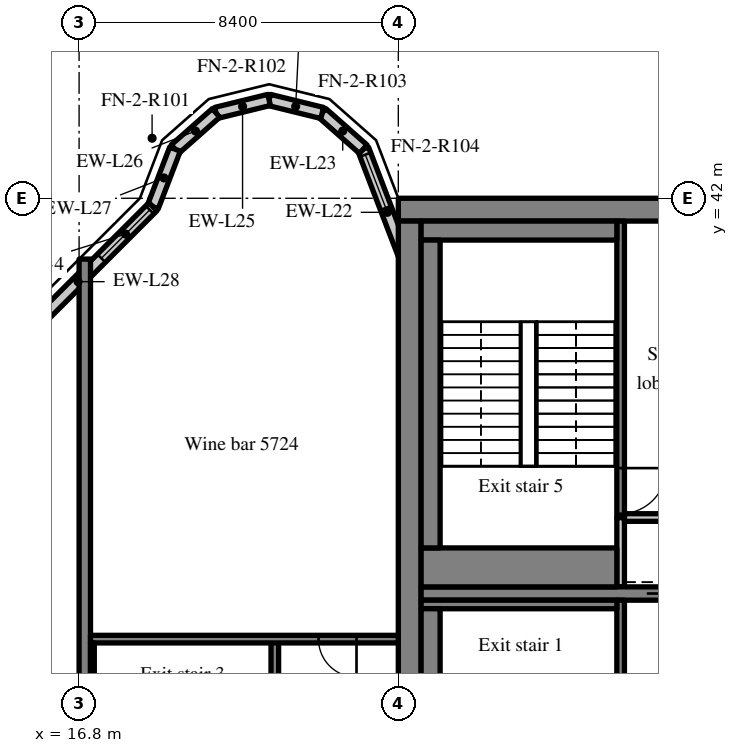
"""IFC4 building model, lengths in metres.
Left out: names, types, materials, properties, quantities, classifications, styles, units other than length and angle.
Written with IfcOpenShell. Run it as: python <this file> out.ifc"""

import sys

from ifc_helpers import new_model, si_unit, direction, frame, frame_2d, origin, place, context, subcontext, project, spatial, rectangle, extrude, source, transform, mapped, element, fill, save


model = new_model("IFC4")
c1 = context("Model", 3, precision=1e-05, world=origin(), true_north=direction((0.0, 1.0)))
c2 = subcontext(c1, "Body", "Model", "MODEL_VIEW")
j1 = project(units=[si_unit("LENGTHUNIT", "METRE"), si_unit("PLANEANGLEUNIT", "RADIAN")], contexts=[c1])
p1 = place(None, origin())
s1 = spatial("IfcSite", under=j1, at=p1, CompositionType="ELEMENT")
p2 = place(p1, origin())
s2 = spatial("IfcBuilding", under=s1, at=p2, CompositionType="ELEMENT")
p3 = place(p2, frame((0.0, 0.0, 237.4)))
s3 = spatial("IfcBuildingStorey", under=s2, at=p3, CompositionType="ELEMENT", Elevation=237.4)
m1 = source(origin(), c2, "Body", "SweptSolid", [
    extrude(rectangle(XDim=50.4, YDim=0.6, at=frame_2d((25.2, 0.0))), origin(), (0.0, 0.0, 1.0), 3.62),
])
p4 = place(p3, frame((25.2, 41.7, 0.0), z_axis=(0.0, 0.0, 1.0), x_axis=(1.0, 0.0, 0.0)))
e1 = element("IfcWall", 1, at=p4, inside=s3, PredefinedType="SHEAR", context=c2, shape_type="MappedRepresentation", body=[
    mapped(m1, transform((0.0, 0.0, 0.0), scale=1.0)),
])
m2 = source(origin(), c2, "Body", "SweptSolid", [
    extrude(rectangle(XDim=18.8, YDim=0.6, at=frame_2d((9.4, 0.0))), origin(), (0.0, 0.0, 1.0), 3.62),
])
p5 = place(p3, frame((25.5, 22.6, 0.0), z_axis=(0.0, 0.0, 1.0), x_axis=(0.0, 1.0, 0.0)))
e2 = element("IfcWall", 2, at=p5, inside=s3, PredefinedType="SHEAR", context=c2, shape_type="MappedRepresentation", body=[
    mapped(m2, transform((0.0, 0.0, 0.0), scale=1.0)),
])
m3 = source(origin(), c2, "Body", "SweptSolid", [
    extrude(rectangle(XDim=7.625, YDim=0.35, at=frame_2d((3.812, 0.0))), origin(), (0.0, 0.0, 1.0), 3.62),
])
p6 = place(p3, frame((25.8, 31.6, 0.0), z_axis=(0.0, 0.0, 1.0), x_axis=(1.0, 0.0, 0.0)))
e3 = element("IfcWall", 3, at=p6, inside=s3, PredefinedType="SHEAR", context=c2, shape_type="MappedRepresentation", body=[
    mapped(m3, transform((0.0, 0.0, 0.0), scale=1.0)),
])
m4 = source(origin(), c2, "Body", "SweptSolid", [
    extrude(rectangle(XDim=1.1, YDim=2.1, at=frame_2d((0.55, 1.05))), frame((0.0, 0.185, 0.0), z_axis=(0.0, -1.0, 0.0), x_axis=(1.0, 0.0, 0.0)), (0.0, 0.0, 1.0), 0.37),
])
p7 = place(p6, frame((5.938, 0.0, 0.0)))
e4 = element("IfcOpeningElement", 4, at=p7, cuts=e3, PredefinedType="OPENING", context=c2, shape_type="MappedRepresentation", body=[
    mapped(m4, transform((0.0, 0.0, 0.0), scale=1.0)),
])
m5 = source(origin(), c2, "Body", "SweptSolid", [
    extrude(rectangle(XDim=18.4, YDim=0.3, at=frame_2d((9.2, 0.0))), origin(), (0.0, 0.0, 1.0), 3.62),
])
p8 = place(p3, frame((16.95, 22.0, 0.0), z_axis=(0.0, 0.0, 1.0), x_axis=(0.0, 1.0, 0.0)))
e5 = element("IfcWall", 5, at=p8, inside=s3, PredefinedType="SHEAR", context=c2, shape_type="MappedRepresentation", body=[
    mapped(m5, transform((0.0, 0.0, 0.0), scale=1.0)),
])
m6 = source(origin(), c2, "Body", "SweptSolid", [
    extrude(rectangle(XDim=3.559, YDim=0.3, at=frame_2d((1.78, 0.0))), origin(), (0.0, 0.0, 1.0), 3.62),
])
p9 = place(p3, frame((25.55, 39.969, 0.0), z_axis=(0.0, 0.0, 1.0), x_axis=(-0.35779745313, 0.933799219604, 0.0)))
e6 = element("IfcWall", 6, at=p9, inside=s3, PredefinedType="SOLIDWALL", context=c2, shape_type="MappedRepresentation", body=[
    mapped(m6, transform((0.0, 0.0, 0.0), scale=1.0)),
])
m7 = source(origin(), c2, "Body", "SweptSolid", [
    extrude(rectangle(XDim=1.5, YDim=2.0, at=frame_2d((0.75, 1.0))), frame((0.0, 0.16, 0.0), z_axis=(0.0, -1.0, 0.0), x_axis=(1.0, 0.0, 0.0)), (0.0, 0.0, 1.0), 0.32),
])
p10 = place(p9, frame((1.903, 0.0, 0.9)))
e7 = element("IfcOpeningElement", 7, at=p10, cuts=e6, PredefinedType="OPENING", context=c2, shape_type="MappedRepresentation", body=[
    mapped(m7, transform((0.0, 0.0, 0.0), scale=1.0)),
])
m8 = source(origin(), c2, "Body", "SweptSolid", [
    extrude(rectangle(XDim=1.44, YDim=0.3, at=frame_2d((0.72, 0.0))), origin(), (0.0, 0.0, 1.0), 3.62),
])
p11 = place(p3, frame((24.277, 43.292, 0.0), z_axis=(0.0, 0.0, 1.0), x_axis=(-0.749649827867, 0.661834673902, 0.0)))
e8 = element("IfcWall", 8, at=p11, inside=s3, PredefinedType="SOLIDWALL", context=c2, shape_type="MappedRepresentation", body=[
    mapped(m8, transform((0.0, 0.0, 0.0), scale=1.0)),
])
m9 = source(origin(), c2, "Body", "SweptSolid", [
    extrude(rectangle(XDim=1.438, YDim=0.3, at=frame_2d((0.719, 0.0))), origin(), (0.0, 0.0, 1.0), 3.62),
])
p12 = place(p3, frame((23.197, 44.245, 0.0), z_axis=(0.0, 0.0, 1.0), x_axis=(-0.971152283879, 0.238460146601, 0.0)))
e9 = element("IfcWall", 9, at=p12, inside=s3, PredefinedType="SOLIDWALL", context=c2, shape_type="MappedRepresentation", body=[
    mapped(m9, transform((0.0, 0.0, 0.0), scale=1.0)),
])
m10 = source(origin(), c2, "Body", "SweptSolid", [
    extrude(rectangle(XDim=1.439, YDim=0.3, at=frame_2d((0.719, 0.0))), origin(), (0.0, 0.0, 1.0), 3.62),
])
p13 = place(p3, frame((21.8, 44.588, 0.0), z_axis=(0.0, 0.0, 1.0), x_axis=(-0.971161932466, -0.238420848351, 0.0)))
e10 = element("IfcWall", 10, at=p13, inside=s3, PredefinedType="SOLIDWALL", context=c2, shape_type="MappedRepresentation", body=[
    mapped(m10, transform((0.0, 0.0, 0.0), scale=1.0)),
])
m11 = source(origin(), c2, "Body", "SweptSolid", [
    extrude(rectangle(XDim=1.44, YDim=0.3, at=frame_2d((0.72, 0.0))), origin(), (0.0, 0.0, 1.0), 3.62),
])
p14 = place(p3, frame((20.403, 44.245, 0.0), z_axis=(0.0, 0.0, 1.0), x_axis=(-0.74957555648, -0.661918790432, 0.0)))
e11 = element("IfcWall", 11, at=p14, inside=s3, PredefinedType="SOLIDWALL", context=c2, shape_type="MappedRepresentation", body=[
    mapped(m11, transform((0.0, 0.0, 0.0), scale=1.0)),
])
m12 = source(origin(), c2, "Body", "SweptSolid", [
    extrude(rectangle(XDim=1.622, YDim=0.3, at=frame_2d((0.811, 0.0))), origin(), (0.0, 0.0, 1.0), 3.62),
])
p15 = place(p3, frame((19.323, 43.292, 0.0), z_axis=(0.0, 0.0, 1.0), x_axis=(-0.357778527068, -0.933806471154, 0.0)))
e12 = element("IfcWall", 12, at=p15, inside=s3, PredefinedType="SOLIDWALL", context=c2, shape_type="MappedRepresentation", body=[
    mapped(m12, transform((0.0, 0.0, 0.0), scale=1.0)),
])
m13 = source(origin(), c2, "Body", "SweptSolid", [
    extrude(rectangle(XDim=5.576, YDim=0.3, at=frame_2d((2.788, 0.0))), origin(), (0.0, 0.0, 1.0), 3.62),
])
p16 = place(p3, frame((18.743, 41.777, 0.0), z_axis=(0.0, 0.0, 1.0), x_axis=(-0.707106781187, -0.707106781187, 0.0)))
e13 = element("IfcWall", 13, at=p16, inside=s3, PredefinedType="SOLIDWALL", context=c2, shape_type="MappedRepresentation", body=[
    mapped(m13, transform((0.0, 0.0, 0.0), scale=1.0)),
])
m14 = source(origin(), c2, "Body", "SweptSolid", [
    extrude(rectangle(XDim=1.8, YDim=1.5, at=frame_2d((0.9, 0.75))), frame((0.0, 0.16, 0.0), z_axis=(0.0, -1.0, 0.0), x_axis=(1.0, 0.0, 0.0)), (0.0, 0.0, 1.0), 0.32),
])
p17 = place(p16, frame((0.118, 0.0, 0.9)))
e14 = element("IfcOpeningElement", 14, at=p17, cuts=e13, PredefinedType="OPENING", context=c2, shape_type="MappedRepresentation", body=[
    mapped(m14, transform((0.0, 0.0, 0.0), scale=1.0)),
])
m15 = source(origin(), c2, "Body", "SweptSolid", [
    extrude(rectangle(XDim=8.825, YDim=0.2, at=frame_2d((4.413, 0.0))), origin(), (0.0, 0.0, 1.0), 3.62),
])
p18 = place(p3, frame((31.05, 22.6, 0.0), z_axis=(0.0, 0.0, 1.0), x_axis=(0.0, 1.0, 0.0)))
e15 = element("IfcWall", 15, at=p18, inside=s3, PredefinedType="SOLIDWALL", context=c2, shape_type="MappedRepresentation", body=[
    mapped(m15, transform((0.0, 0.0, 0.0), scale=1.0)),
])
m16 = source(origin(), c2, "Body", "SweptSolid", [
    extrude(rectangle(XDim=1.2, YDim=2.1, at=frame_2d((0.6, 1.05))), frame((0.0, 0.11, 0.0), z_axis=(0.0, -1.0, 0.0), x_axis=(1.0, 0.0, 0.0)), (0.0, 0.0, 1.0), 0.22),
])
p19 = place(p18, frame((1.0, 0.0, 0.0)))
e16 = element("IfcOpeningElement", 16, at=p19, cuts=e15, PredefinedType="OPENING", context=c2, shape_type="MappedRepresentation", body=[
    mapped(m16, transform((0.0, 0.0, 0.0), scale=1.0)),
])
m17 = source(origin(), c2, "Body", "SweptSolid", [
    extrude(rectangle(XDim=1.825, YDim=0.2, at=frame_2d((0.913, 0.0))), origin(), (0.0, 0.0, 1.0), 3.62),
])
p20 = place(p3, frame((31.05, 31.775, 0.0), z_axis=(0.0, 0.0, 1.0), x_axis=(0.0, 1.0, 0.0)))
e17 = element("IfcWall", 17, at=p20, inside=s3, PredefinedType="SOLIDWALL", context=c2, shape_type="MappedRepresentation", body=[
    mapped(m17, transform((0.0, 0.0, 0.0), scale=1.0)),
])
m18 = source(origin(), c2, "Body", "SweptSolid", [
    extrude(rectangle(XDim=2.275, YDim=0.2, at=frame_2d((1.138, 0.0))), origin(), (0.0, 0.0, 1.0), 3.62),
])
p21 = place(p3, frame((31.15, 33.6, 0.0), z_axis=(0.0, 0.0, 1.0), x_axis=(1.0, 0.0, 0.0)))
e18 = element("IfcWall", 18, at=p21, inside=s3, PredefinedType="SOLIDWALL", context=c2, shape_type="MappedRepresentation", body=[
    mapped(m18, transform((0.0, 0.0, 0.0), scale=1.0)),
])
m19 = source(origin(), c2, "Body", "SweptSolid", [
    extrude(rectangle(XDim=7.8, YDim=0.2, at=frame_2d((3.9, 0.0))), origin(), (0.0, 0.0, 1.0), 3.62),
])
p22 = place(p3, frame((31.05, 33.6, 0.0), z_axis=(0.0, 0.0, 1.0), x_axis=(0.0, 1.0, 0.0)))
e19 = element("IfcWall", 19, at=p22, inside=s3, PredefinedType="SOLIDWALL", context=c2, shape_type="MappedRepresentation", body=[
    mapped(m19, transform((0.0, 0.0, 0.0), scale=1.0)),
])
p23 = place(p22, frame((0.1, 0.0, 0.0)))
e20 = element("IfcOpeningElement", 20, at=p23, cuts=e19, PredefinedType="OPENING", context=c2, shape_type="MappedRepresentation", body=[
    mapped(m16, transform((0.0, 0.0, 0.0), scale=1.0)),
])
m20 = source(origin(), c2, "Body", "SweptSolid", [
    extrude(rectangle(XDim=8.3, YDim=0.2, at=frame_2d((4.15, 0.0))), origin(), (0.0, 0.0, 1.0), 3.62),
])
p24 = place(p3, frame((21.95, 22.1, 0.0), z_axis=(0.0, 0.0, 1.0), x_axis=(0.0, 1.0, 0.0)))
e21 = element("IfcWall", 21, at=p24, inside=s3, PredefinedType="SOLIDWALL", context=c2, shape_type="MappedRepresentation", body=[
    mapped(m20, transform((0.0, 0.0, 0.0), scale=1.0)),
])
p25 = place(p24, frame((0.6, 0.0, 0.0)))
e22 = element("IfcOpeningElement", 22, at=p25, cuts=e21, PredefinedType="OPENING", context=c2, shape_type="MappedRepresentation", body=[
    mapped(m16, transform((0.0, 0.0, 0.0), scale=1.0)),
])
m21 = source(origin(), c2, "Body", "SweptSolid", [
    extrude(rectangle(XDim=8.1, YDim=0.2, at=frame_2d((4.05, 0.0))), origin(), (0.0, 0.0, 1.0), 3.62),
])
p26 = place(p3, frame((17.1, 30.4, 0.0), z_axis=(0.0, 0.0, 1.0), x_axis=(1.0, 0.0, 0.0)))
e23 = element("IfcWall", 23, at=p26, inside=s3, PredefinedType="SOLIDWALL", context=c2, shape_type="MappedRepresentation", body=[
    mapped(m21, transform((0.0, 0.0, 0.0), scale=1.0)),
])
m22 = source(origin(), c2, "Body", "SweptSolid", [
    extrude(rectangle(XDim=1.0, YDim=2.1, at=frame_2d((0.5, 1.05))), frame((0.0, 0.11, 0.0), z_axis=(0.0, -1.0, 0.0), x_axis=(1.0, 0.0, 0.0)), (0.0, 0.0, 1.0), 0.22),
])
p27 = place(p26, frame((6.0, 0.0, 0.0)))
e24 = element("IfcOpeningElement", 24, at=p27, cuts=e23, PredefinedType="OPENING", context=c2, shape_type="MappedRepresentation", body=[
    mapped(m22, transform((0.0, 0.0, 0.0), scale=1.0)),
])
m23 = source(origin(), c2, "Body", "SweptSolid", [
    extrude(rectangle(XDim=5.15, YDim=0.225, at=frame_2d((2.575, 0.0))), origin(), (0.0, 0.0, 1.0), 3.62),
])
p28 = place(p3, frame((25.8, 31.312, 0.0), z_axis=(0.0, 0.0, 1.0), x_axis=(1.0, 0.0, 0.0)))
e25 = element("IfcWall", 25, at=p28, inside=s3, PredefinedType="SOLIDWALL", context=c2, shape_type="MappedRepresentation", body=[
    mapped(m23, transform((0.0, 0.0, 0.0), scale=1.0)),
])
m24 = source(origin(), c2, "Body", "SweptSolid", [
    extrude(rectangle(XDim=8.1, YDim=0.5, at=frame_2d((4.05, 0.0))), origin(), (0.0, 0.0, 1.0), 3.62),
])
p29 = place(p3, frame((26.05, 23.1, 0.0), z_axis=(0.0, 0.0, 1.0), x_axis=(0.0, 1.0, 0.0)))
e26 = element("IfcWall", 26, at=p29, inside=s3, PredefinedType="SOLIDWALL", context=c2, shape_type="MappedRepresentation", body=[
    mapped(m24, transform((0.0, 0.0, 0.0), scale=1.0)),
])
m25 = source(origin(), c2, "Body", "SweptSolid", [
    extrude(rectangle(XDim=8.1, YDim=0.1, at=frame_2d((4.05, 0.0))), origin(), (0.0, 0.0, 1.0), 3.62),
])
p30 = place(p3, frame((17.15, 22.2, 0.0), z_axis=(0.0, 0.0, 1.0), x_axis=(0.0, 1.0, 0.0)))
e27 = element("IfcWall", 27, at=p30, inside=s3, PredefinedType="SOLIDWALL", context=c2, shape_type="MappedRepresentation", body=[
    mapped(m25, transform((0.0, 0.0, 0.0), scale=1.0)),
])
m26 = source(origin(), c2, "Body", "SweptSolid", [
    extrude(rectangle(XDim=5.15, YDim=0.5, at=frame_2d((2.575, 0.0))), origin(), (0.0, 0.0, 1.0), 3.62),
])
p31 = place(p3, frame((25.8, 41.15, 0.0), z_axis=(0.0, 0.0, 1.0), x_axis=(1.0, 0.0, 0.0)))
e28 = element("IfcWall", 28, at=p31, inside=s3, PredefinedType="SOLIDWALL", context=c2, shape_type="MappedRepresentation", body=[
    mapped(m26, transform((0.0, 0.0, 0.0), scale=1.0)),
])
m27 = source(origin(), c2, "Body", "SweptSolid", [
    extrude(rectangle(XDim=5.15, YDim=1.025, at=frame_2d((2.575, 0.0))), origin(), (0.0, 0.0, 1.0), 3.62),
])
p32 = place(p3, frame((25.8, 32.287, 0.0), z_axis=(0.0, 0.0, 1.0), x_axis=(1.0, 0.0, 0.0)))
e29 = element("IfcWall", 29, at=p32, inside=s3, PredefinedType="SOLIDWALL", context=c2, shape_type="MappedRepresentation", body=[
    mapped(m27, transform((0.0, 0.0, 0.0), scale=1.0)),
])
p33 = place(p3, frame((26.05, 32.8, 0.0), z_axis=(0.0, 0.0, 1.0), x_axis=(0.0, 1.0, 0.0)))
e30 = element("IfcWall", 30, at=p33, inside=s3, PredefinedType="SOLIDWALL", context=c2, shape_type="MappedRepresentation", body=[
    mapped(m24, transform((0.0, 0.0, 0.0), scale=1.0)),
])
m28 = source(origin(), c2, "Body", "SweptSolid", [
    extrude(rectangle(XDim=1.5, YDim=2.0, at=frame_2d((0.75, 1.0))), frame((0.0, 0.03, 0.0), z_axis=(0.0, -1.0, 0.0), x_axis=(1.0, 0.0, 0.0)), (0.0, 0.0, 1.0), 0.06),
])
p34 = place(p10, origin())
e31 = element("IfcWindow", 31, at=p34, inside=s3, PartitioningType="SINGLE_PANEL", PredefinedType="WINDOW", context=c2, shape_type="MappedRepresentation", body=[
    mapped(m28, transform((0.0, 0.0, 0.0), scale=1.0)),
])
fill(e7, e31)
m29 = source(origin(), c2, "Body", "SweptSolid", [
    extrude(rectangle(XDim=1.8, YDim=1.5, at=frame_2d((0.9, 0.75))), frame((0.0, 0.03, 0.0), z_axis=(0.0, -1.0, 0.0), x_axis=(1.0, 0.0, 0.0)), (0.0, 0.0, 1.0), 0.06),
])
p35 = place(p17, origin())
e32 = element("IfcWindow", 32, at=p35, inside=s3, PartitioningType="SINGLE_PANEL", PredefinedType="WINDOW", context=c2, shape_type="MappedRepresentation", body=[
    mapped(m29, transform((0.0, 0.0, 0.0), scale=1.0)),
])
fill(e14, e32)
m30 = source(origin(), c2, "Body", "SweptSolid", [
    extrude(rectangle(XDim=1.1, YDim=2.1, at=frame_2d((0.55, 1.05))), frame((0.0, 0.025, 0.0), z_axis=(0.0, -1.0, 0.0), x_axis=(1.0, 0.0, 0.0)), (0.0, 0.0, 1.0), 0.05),
])
p36 = place(p7, origin())
e33 = element("IfcDoor", 33, at=p36, inside=s3, OperationType="SLIDING_TO_RIGHT", PredefinedType="DOOR", context=c2, shape_type="MappedRepresentation", body=[
    mapped(m30, transform((0.0, 0.0, 0.0), scale=1.0)),
])
fill(e4, e33)
m31 = source(origin(), c2, "Body", "SweptSolid", [
    extrude(rectangle(XDim=1.2, YDim=2.1, at=frame_2d((0.6, 1.05))), frame((0.0, 0.025, 0.0), z_axis=(0.0, -1.0, 0.0), x_axis=(1.0, 0.0, 0.0)), (0.0, 0.0, 1.0), 0.05),
])
p37 = place(p23, origin())
e34 = element("IfcDoor", 34, at=p37, inside=s3, OperationType="SINGLE_SWING_RIGHT", PredefinedType="DOOR", context=c2, shape_type="MappedRepresentation", body=[
    mapped(m31, transform((0.0, 0.0, 0.0), scale=1.0)),
])
fill(e20, e34)
m32 = source(origin(), c2, "Body", "SweptSolid", [
    extrude(rectangle(XDim=1.0, YDim=2.1, at=frame_2d((0.5, 1.05))), frame((0.0, 0.025, 0.0), z_axis=(0.0, -1.0, 0.0), x_axis=(1.0, 0.0, 0.0)), (0.0, 0.0, 1.0), 0.05),
])
p38 = place(p27, origin())
e35 = element("IfcDoor", 35, at=p38, inside=s3, OperationType="SINGLE_SWING_RIGHT", PredefinedType="DOOR", context=c2, shape_type="MappedRepresentation", body=[
    mapped(m32, transform((0.0, 0.0, 0.0), scale=1.0)),
])
fill(e24, e35)
save(model, sys.argv[1])
